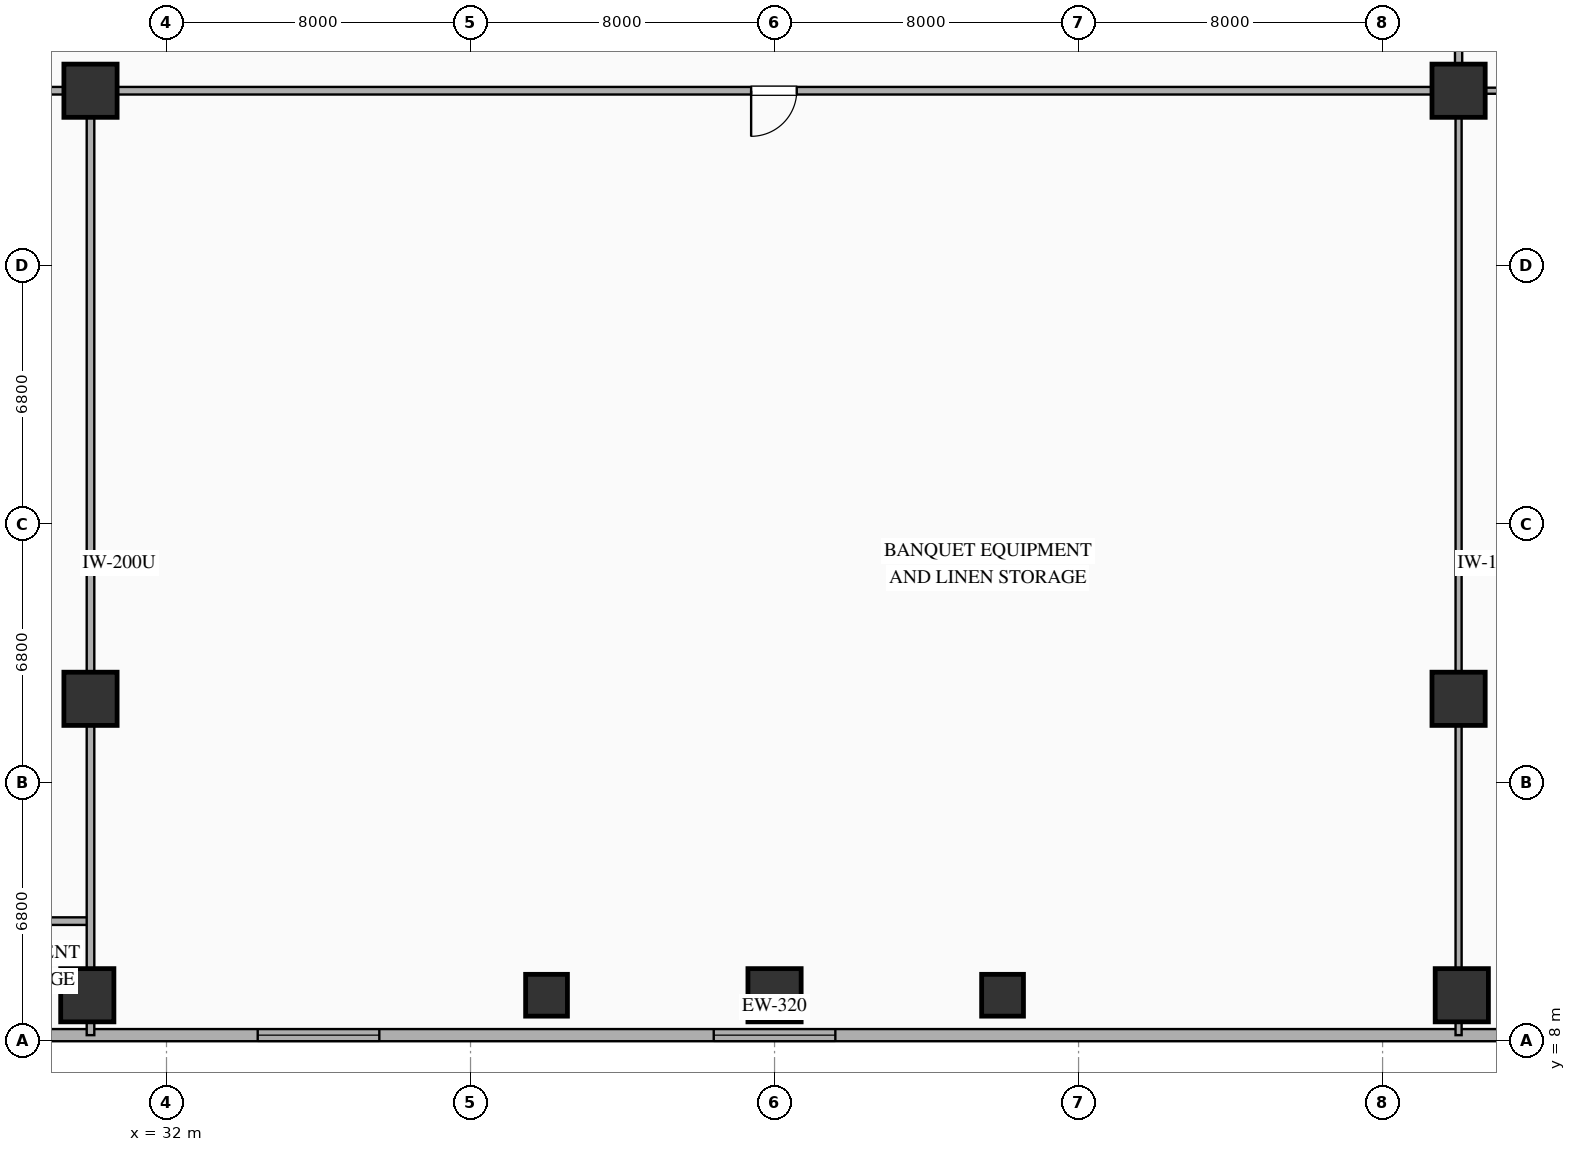
"""IFC4 building model, lengths in metres.
Left out: names, types, materials, properties, quantities, classifications, styles, units other than length and angle.
Written with IfcOpenShell. Run it as: python <this file> out.ifc"""

import sys

from ifc_helpers import new_model, si_unit, direction, frame, frame_2d, origin, origin_2d, place, context, subcontext, project, spatial, rectangle, extrude, element, fill, save


model = new_model("IFC4")
c1 = context("Model", 3, precision=1e-05, world=origin(), true_north=direction((0.0, 1.0)))
c2 = subcontext(c1, "Body", "Model", "MODEL_VIEW")
j1 = project(units=[si_unit("LENGTHUNIT", "METRE"), si_unit("PLANEANGLEUNIT", "RADIAN")], contexts=[c1])
p1 = place(None, origin())
s1 = spatial("IfcSite", under=j1, at=p1, CompositionType="ELEMENT")
p2 = place(p1, origin())
s2 = spatial("IfcBuilding", under=s1, at=p2, CompositionType="ELEMENT")
p3 = place(p2, frame((0.0, 0.0, 16.8)))
s3 = spatial("IfcBuildingStorey", under=s2, at=p3, CompositionType="ELEMENT", Elevation=16.8)
for number, where, z_axis, x_axis in (
    (1, (42.0, 9.2, 0.0), (0.0, 0.0, 1.0), (1.0, 0.0, 0.0)),
    (2, (54.0, 9.2, 0.0), (0.0, 0.0, 1.0), (1.0, 0.0, 0.0)),
):
    element("IfcColumn", number, at=place(p3, frame(where, z_axis=z_axis, x_axis=x_axis)), inside=s3, PredefinedType="COLUMN", context=c2, shape_type="SweptSolid", body=[
        extrude(rectangle(XDim=1.1, YDim=1.1, at=origin_2d()), origin(), (0.0, 0.0, 1.0), 5.05),
    ])
for number, where, z_axis, x_axis in (
    (3, (30.0, 17.0, 0.0), (0.0, 0.0, 1.0), (1.0, 0.0, 0.0)),
    (4, (66.0, 17.0, 0.0), (0.0, 0.0, 1.0), (1.0, 0.0, 0.0)),
    (5, (30.0, 33.0, 0.0), (0.0, 0.0, 1.0), (1.0, 0.0, 0.0)),
    (6, (66.0, 33.0, 0.0), (0.0, 0.0, 1.0), (1.0, 0.0, 0.0)),
    (7, (29.916, 9.2, 0.0), (0.0, 0.0, 1.0), (1.0, 0.0, 0.0)),
    (8, (48.0, 9.2, 0.0), (0.0, 0.0, 1.0), (1.0, 0.0, 0.0)),
    (9, (66.084, 9.2, 0.0), (0.0, 0.0, 1.0), (1.0, 0.0, 0.0)),
):
    element("IfcColumn", number, at=place(p3, frame(where, z_axis=z_axis, x_axis=x_axis)), inside=s3, PredefinedType="COLUMN", context=c2, shape_type="SweptSolid", body=[
        extrude(rectangle(XDim=1.4, YDim=1.4, at=origin_2d()), origin(), (0.0, 0.0, 1.0), 5.05),
    ])
p4 = place(p3, frame((9.65, 8.15, 0.0), z_axis=(0.0, 0.0, 1.0), x_axis=(1.0, 0.0, 0.0)))
e10 = element("IfcWall", 10, at=p4, inside=s3, PredefinedType="SOLIDWALL", context=c2, shape_type="SweptSolid", body=[
    extrude(rectangle(XDim=76.7, YDim=0.32, at=frame_2d((38.35, 0.0))), origin(), (0.0, 0.0, 1.0), 5.05),
])
p5 = place(p4, frame((3.775, 0.0, 0.9)))
e11 = element("IfcOpeningElement", 11, at=p5, cuts=e10, PredefinedType="OPENING", context=c2, shape_type="SweptSolid", body=[
    extrude(rectangle(XDim=3.2, YDim=3.95, at=frame_2d((1.6, 1.975))), frame((0.0, 0.17, 0.0), z_axis=(0.0, -1.0, 0.0), x_axis=(1.0, 0.0, 0.0)), (0.0, 0.0, 1.0), 0.34),
])
p6 = place(p4, frame((13.75, 0.0, 0.9)))
e12 = element("IfcOpeningElement", 12, at=p6, cuts=e10, PredefinedType="OPENING", context=c2, shape_type="SweptSolid", body=[
    extrude(rectangle(XDim=3.2, YDim=3.95, at=frame_2d((1.6, 1.975))), frame((0.0, 0.17, 0.0), z_axis=(0.0, -1.0, 0.0), x_axis=(1.0, 0.0, 0.0)), (0.0, 0.0, 1.0), 0.34),
])
p7 = place(p4, frame((24.75, 0.0, 0.9)))
e13 = element("IfcOpeningElement", 13, at=p7, cuts=e10, PredefinedType="OPENING", context=c2, shape_type="SweptSolid", body=[
    extrude(rectangle(XDim=3.2, YDim=3.95, at=frame_2d((1.6, 1.975))), frame((0.0, 0.17, 0.0), z_axis=(0.0, -1.0, 0.0), x_axis=(1.0, 0.0, 0.0)), (0.0, 0.0, 1.0), 0.34),
])
p8 = place(p4, frame((36.75, 0.0, 0.9)))
e14 = element("IfcOpeningElement", 14, at=p8, cuts=e10, PredefinedType="OPENING", context=c2, shape_type="SweptSolid", body=[
    extrude(rectangle(XDim=3.2, YDim=3.95, at=frame_2d((1.6, 1.975))), frame((0.0, 0.17, 0.0), z_axis=(0.0, -1.0, 0.0), x_axis=(1.0, 0.0, 0.0)), (0.0, 0.0, 1.0), 0.34),
])
p9 = place(p3, frame((66.0, 33.0, 0.0), z_axis=(0.0, 0.0, 1.0), x_axis=(-1.0, 0.0, 0.0)))
e15 = element("IfcWall", 15, at=p9, inside=s3, PredefinedType="PARTITIONING", context=c2, shape_type="SweptSolid", body=[
    extrude(rectangle(XDim=57.85, YDim=0.2, at=frame_2d((28.925, 0.0))), origin(), (0.0, 0.0, 1.0), 3.65),
])
p10 = place(p9, frame((17.416, 0.0, 0.0)))
e16 = element("IfcOpeningElement", 16, at=p10, cuts=e15, PredefinedType="OPENING", context=c2, shape_type="SweptSolid", body=[
    extrude(rectangle(XDim=1.2, YDim=2.25, at=frame_2d((0.6, 1.125))), frame((0.0, 0.11, 0.0), z_axis=(0.0, -1.0, 0.0), x_axis=(1.0, 0.0, 0.0)), (0.0, 0.0, 1.0), 0.22),
])
p11 = place(p9, frame((41.684, 0.0, 0.0)))
e17 = element("IfcOpeningElement", 17, at=p11, cuts=e15, PredefinedType="OPENING", context=c2, shape_type="SweptSolid", body=[
    extrude(rectangle(XDim=1.8, YDim=2.2, at=frame_2d((0.9, 1.1))), frame((0.0, 0.11, 0.0), z_axis=(0.0, -1.0, 0.0), x_axis=(1.0, 0.0, 0.0)), (0.0, 0.0, 1.0), 0.22),
])
p12 = place(p3, frame((66.0, 60.8, 0.0), z_axis=(0.0, 0.0, 1.0), x_axis=(0.0, -1.0, 0.0)))
e18 = element("IfcWall", 18, at=p12, inside=s3, PredefinedType="PARTITIONING", context=c2, shape_type="SweptSolid", body=[
    extrude(rectangle(XDim=27.8, YDim=0.19, at=frame_2d((13.9, 0.0))), origin(), (0.0, 0.0, 1.0), 3.65),
])
p13 = place(p12, frame((13.6, 0.0, 0.0)))
e19 = element("IfcOpeningElement", 19, at=p13, cuts=e18, PredefinedType="OPENING", context=c2, shape_type="SweptSolid", body=[
    extrude(rectangle(XDim=1.2, YDim=2.25, at=frame_2d((0.6, 1.125))), frame((0.0, 0.105, 0.0), z_axis=(0.0, -1.0, 0.0), x_axis=(1.0, 0.0, 0.0)), (0.0, 0.0, 1.0), 0.21),
])
p14 = place(p3, frame((66.0, 33.0, 0.0), z_axis=(0.0, 0.0, 1.0), x_axis=(0.0, -1.0, 0.0)))
e20 = element("IfcWall", 20, at=p14, inside=s3, PredefinedType="PLUMBINGWALL", context=c2, shape_type="SweptSolid", body=[
    extrude(rectangle(XDim=24.85, YDim=0.16, at=frame_2d((12.425, 0.0))), origin(), (0.0, 0.0, 1.0), 3.65),
])
p15 = place(p3, frame((30.0, 11.15, 0.0), z_axis=(0.0, 0.0, 1.0), x_axis=(-1.0, 0.0, 0.0)))
e21 = element("IfcWall", 21, at=p15, inside=s3, PredefinedType="PARTITIONING", context=c2, shape_type="SweptSolid", body=[
    extrude(rectangle(XDim=21.85, YDim=0.2, at=frame_2d((10.925, 0.0))), origin(), (0.0, 0.0, 1.0), 3.65),
])
p16 = place(p15, frame((10.675, 0.0, 0.0)))
e22 = element("IfcOpeningElement", 22, at=p16, cuts=e21, PredefinedType="OPENING", context=c2, shape_type="SweptSolid", body=[
    extrude(rectangle(XDim=1.1, YDim=2.2, at=frame_2d((0.55, 1.1))), frame((0.0, 0.11, 0.0), z_axis=(0.0, -1.0, 0.0), x_axis=(1.0, 0.0, 0.0)), (0.0, 0.0, 1.0), 0.22),
])
p17 = place(p3, frame((30.0, 33.0, 0.0), z_axis=(0.0, 0.0, 1.0), x_axis=(0.0, -1.0, 0.0)))
e23 = element("IfcWall", 23, at=p17, inside=s3, PredefinedType="PARTITIONING", context=c2, shape_type="SweptSolid", body=[
    extrude(rectangle(XDim=24.85, YDim=0.2, at=frame_2d((12.425, 0.0))), origin(), (0.0, 0.0, 1.0), 3.65),
])
p18 = place(p3, frame((66.0, 33.0, 0.0), z_axis=(0.0, 0.0, 1.0), x_axis=(1.0, 0.0, 0.0)))
e24 = element("IfcWall", 24, at=p18, inside=s3, PredefinedType="PLUMBINGWALL", context=c2, shape_type="SweptSolid", body=[
    extrude(rectangle(XDim=21.85, YDim=0.16, at=frame_2d((10.925, 0.0))), origin(), (0.0, 0.0, 1.0), 3.65),
])
p19 = place(p18, frame((11.825, 0.0, 0.0)))
e25 = element("IfcOpeningElement", 25, at=p19, cuts=e24, PredefinedType="OPENING", context=c2, shape_type="SweptSolid", body=[
    extrude(rectangle(XDim=1.2, YDim=2.25, at=frame_2d((0.6, 1.125))), frame((0.0, 0.09, 0.0), z_axis=(0.0, -1.0, 0.0), x_axis=(1.0, 0.0, 0.0)), (0.0, 0.0, 1.0), 0.18),
])
p20 = place(p7, origin())
e26 = element("IfcWindow", 26, at=p20, inside=s3, PartitioningType="SINGLE_PANEL", PredefinedType="WINDOW", context=c2, shape_type="SweptSolid", body=[
    extrude(rectangle(XDim=3.2, YDim=3.95, at=frame_2d((1.6, 1.975))), frame((0.0, 0.03, 0.0), z_axis=(0.0, -1.0, 0.0), x_axis=(1.0, 0.0, 0.0)), (0.0, 0.0, 1.0), 0.06),
])
fill(e13, e26)
p21 = place(p8, origin())
e27 = element("IfcWindow", 27, at=p21, inside=s3, PartitioningType="SINGLE_PANEL", PredefinedType="WINDOW", context=c2, shape_type="SweptSolid", body=[
    extrude(rectangle(XDim=3.2, YDim=3.95, at=frame_2d((1.6, 1.975))), frame((0.0, 0.03, 0.0), z_axis=(0.0, -1.0, 0.0), x_axis=(1.0, 0.0, 0.0)), (0.0, 0.0, 1.0), 0.06),
])
fill(e14, e27)
p22 = place(p10, origin())
e28 = element("IfcDoor", 28, at=p22, inside=s3, OperationType="SINGLE_SWING_RIGHT", PredefinedType="DOOR", context=c2, shape_type="SweptSolid", body=[
    extrude(rectangle(XDim=1.2, YDim=2.25, at=frame_2d((0.6, 1.125))), frame((0.0, 0.025, 0.0), z_axis=(0.0, -1.0, 0.0), x_axis=(1.0, 0.0, 0.0)), (0.0, 0.0, 1.0), 0.05),
])
fill(e16, e28)
save(model, sys.argv[1])
